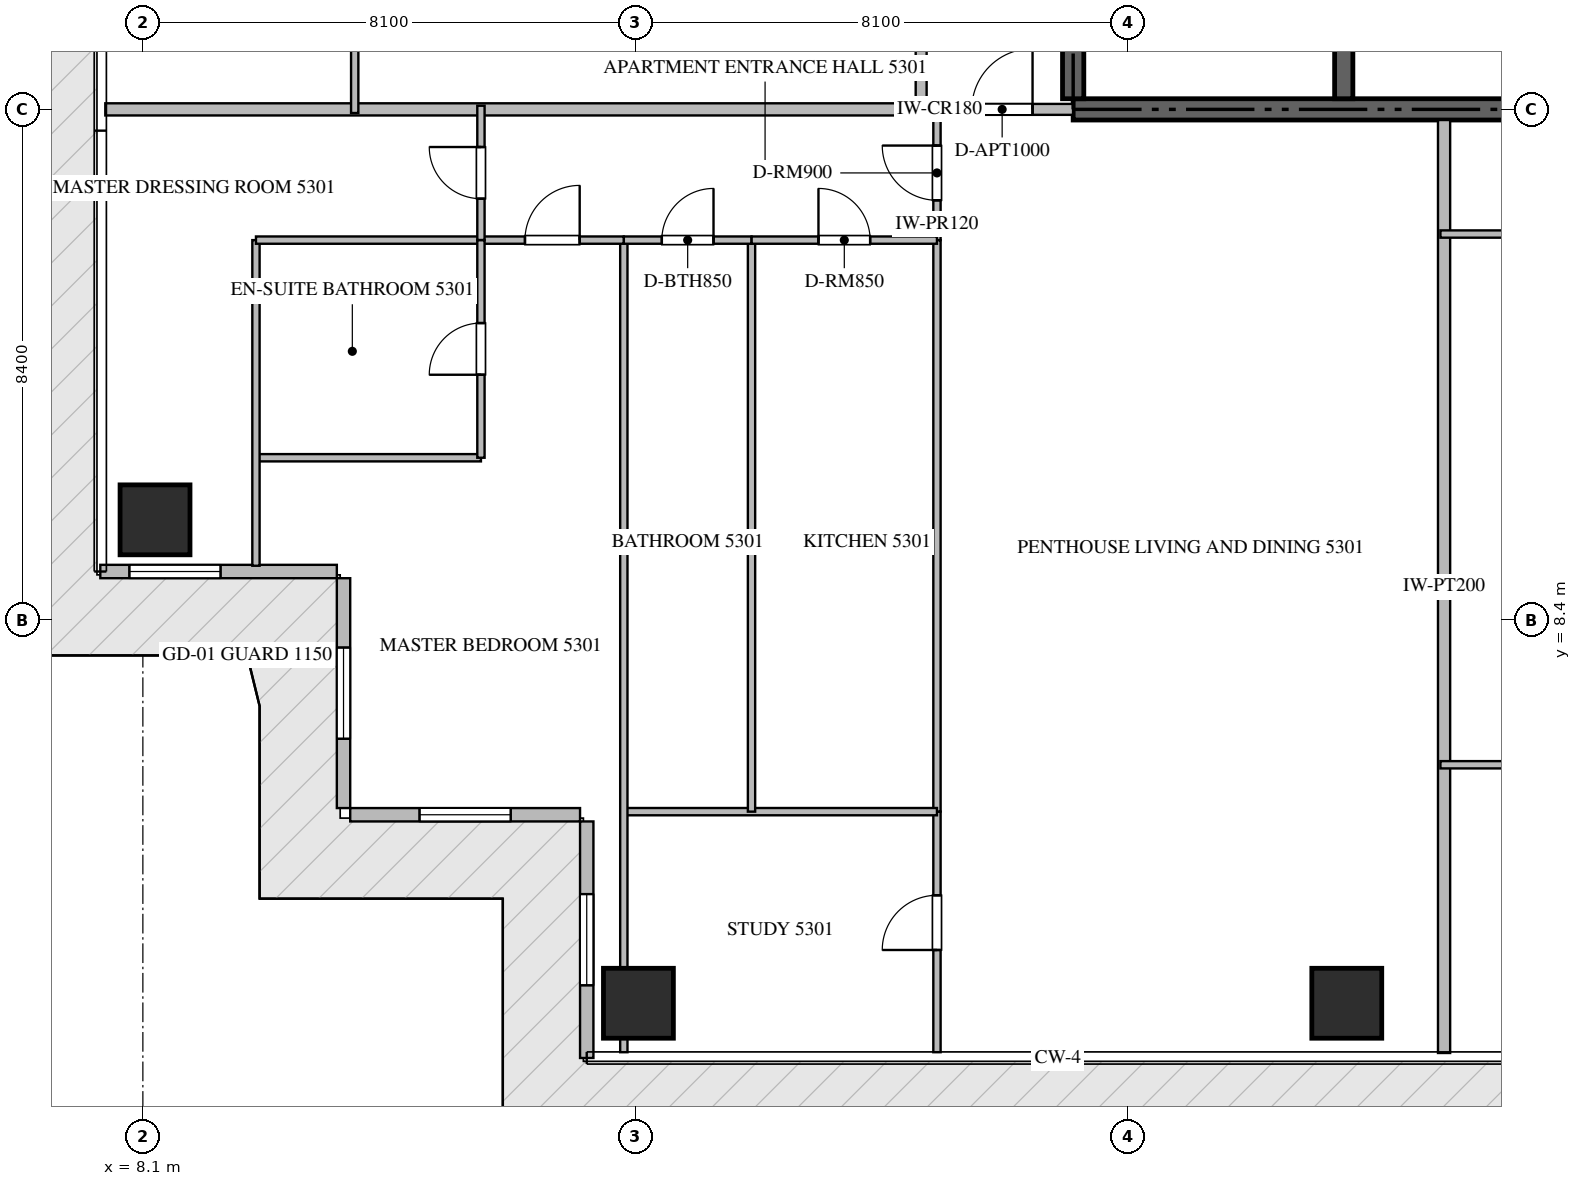
"""IFC4 building model, lengths in metres.
Left out: names, types, materials, properties, quantities, classifications, styles, units other than length and angle.
Written with IfcOpenShell. Run it as: python <this file> out.ifc"""

import sys

from ifc_helpers import new_model, si_unit, direction, frame, frame_2d, origin, origin_2d, place, context, subcontext, project, spatial, rectangle, extrude, source, transform, mapped, element, fill, save


model = new_model("IFC4")
c1 = context("Model", 3, precision=1e-05, world=origin(), true_north=direction((0.0, 1.0)))
c2 = subcontext(c1, "Body", "Model", "MODEL_VIEW")
j1 = project(units=[si_unit("LENGTHUNIT", "METRE"), si_unit("PLANEANGLEUNIT", "RADIAN")], contexts=[c1])
p1 = place(None, origin())
s1 = spatial("IfcSite", under=j1, at=p1, CompositionType="ELEMENT")
p2 = place(p1, origin())
s2 = spatial("IfcBuilding", under=s1, at=p2, CompositionType="ELEMENT")
p3 = place(p2, frame((0.0, 0.0, 214.3)))
s3 = spatial("IfcBuildingStorey", under=s2, at=p3, CompositionType="ELEMENT", Elevation=214.3)
p4 = place(p3, frame((23.4, 16.8, -0.26), z_axis=(0.0, 0.0, 1.0), x_axis=(1.0, 0.0, 0.0)))
e1 = element("IfcWall", 1, at=p4, inside=s3, PredefinedType="SHEAR", context=c2, shape_type="SweptSolid", body=[
    extrude(rectangle(XDim=18.0, YDim=0.35, at=frame_2d((9.0, 0.0))), origin(), (0.0, 0.0, 1.0), 3.848),
])
p5 = place(p3, frame((23.4, 16.975, -0.26), z_axis=(0.0, 0.0, 1.0), x_axis=(0.0, 1.0, 0.0)))
e2 = element("IfcWall", 2, at=p5, inside=s3, PredefinedType="SHEAR", context=c2, shape_type="SweptSolid", body=[
    extrude(rectangle(XDim=4.875, YDim=0.35, at=frame_2d((2.438, 0.0))), origin(), (0.0, 0.0, 1.0), 3.848),
])
p6 = place(p3, frame((27.85, 16.975, -0.26), z_axis=(0.0, 0.0, 1.0), x_axis=(0.0, 1.0, 0.0)))
e3 = element("IfcWall", 3, at=p6, inside=s3, PredefinedType="SHEAR", context=c2, shape_type="SweptSolid", body=[
    extrude(rectangle(XDim=4.875, YDim=0.3, at=frame_2d((2.438, 0.0))), origin(), (0.0, 0.0, 1.0), 3.848),
])
m1 = source(origin(), c2, "Body", "SweptSolid", [
    extrude(rectangle(XDim=1.15, YDim=1.15, at=origin_2d()), origin(), (0.0, 0.0, 1.0), 3.85),
])
for number, where, z_axis, x_axis in (
    (4, (16.25, 2.1, -0.26), (0.0, 0.0, 1.0), (1.0, 0.0, 0.0)),
    (5, (27.9, 2.1, -0.26), (0.0, 0.0, 1.0), (1.0, 0.0, 0.0)),
    (6, (8.3, 10.05, -0.26), (0.0, 0.0, 1.0), (1.0, 0.0, 0.0)),
):
    element("IfcColumn", number, at=place(p3, frame(where, z_axis=z_axis, x_axis=x_axis)), inside=s3, PredefinedType="COLUMN", context=c2, shape_type="MappedRepresentation", body=[
        mapped(m1, transform((0.0, 0.0, 0.0), scale=1.0)),
    ])
p7 = place(p3, frame((7.4, 9.2, 0.0), z_axis=(0.0, 0.0, 1.0), x_axis=(1.0, 0.0, 0.0)))
e7 = element("IfcWall", 7, at=p7, inside=s3, PredefinedType="ELEMENTEDWALL", context=c2, shape_type="SweptSolid", body=[
    extrude(rectangle(XDim=3.89, YDim=0.22, at=frame_2d((1.945, 0.0))), origin(), (0.0, 0.0, 1.0), 3.575),
])
p8 = place(p7, frame((0.478, 0.0, 0.65)))
e8 = element("IfcOpeningElement", 8, at=p8, cuts=e7, PredefinedType="OPENING", context=c2, shape_type="SweptSolid", body=[
    extrude(rectangle(XDim=1.5, YDim=2.25, at=frame_2d((0.75, 1.125))), frame((0.0, 0.12, 0.0), z_axis=(0.0, -1.0, 0.0), x_axis=(1.0, 0.0, 0.0)), (0.0, 0.0, 1.0), 0.24),
])
p9 = place(p3, frame((11.4, 9.09, 0.0), z_axis=(0.0, 0.0, 1.0), x_axis=(0.0, -1.0, 0.0)))
e9 = element("IfcWall", 9, at=p9, inside=s3, PredefinedType="ELEMENTEDWALL", context=c2, shape_type="SweptSolid", body=[
    extrude(rectangle(XDim=3.78, YDim=0.22, at=frame_2d((1.89, 0.0))), origin(), (0.0, 0.0, 1.0), 3.575),
])
p10 = place(p9, frame((1.14, 0.0, 0.65)))
e10 = element("IfcOpeningElement", 10, at=p10, cuts=e9, PredefinedType="OPENING", context=c2, shape_type="SweptSolid", body=[
    extrude(rectangle(XDim=1.5, YDim=2.25, at=frame_2d((0.75, 1.125))), frame((0.0, 0.12, 0.0), z_axis=(0.0, -1.0, 0.0), x_axis=(1.0, 0.0, 0.0)), (0.0, 0.0, 1.0), 0.24),
])
p11 = place(p3, frame((11.51, 5.2, 0.0), z_axis=(0.0, 0.0, 1.0), x_axis=(1.0, 0.0, 0.0)))
e11 = element("IfcWall", 11, at=p11, inside=s3, PredefinedType="ELEMENTEDWALL", context=c2, shape_type="SweptSolid", body=[
    extrude(rectangle(XDim=3.78, YDim=0.22, at=frame_2d((1.89, 0.0))), origin(), (0.0, 0.0, 1.0), 3.575),
])
p12 = place(p11, frame((1.14, 0.0, 0.65)))
e12 = element("IfcOpeningElement", 12, at=p12, cuts=e11, PredefinedType="OPENING", context=c2, shape_type="SweptSolid", body=[
    extrude(rectangle(XDim=1.5, YDim=2.25, at=frame_2d((0.75, 1.125))), frame((0.0, 0.12, 0.0), z_axis=(0.0, -1.0, 0.0), x_axis=(1.0, 0.0, 0.0)), (0.0, 0.0, 1.0), 0.24),
])
p13 = place(p3, frame((15.4, 5.09, 0.0), z_axis=(0.0, 0.0, 1.0), x_axis=(0.0, -1.0, 0.0)))
e13 = element("IfcWall", 13, at=p13, inside=s3, PredefinedType="ELEMENTEDWALL", context=c2, shape_type="SweptSolid", body=[
    extrude(rectangle(XDim=3.89, YDim=0.22, at=frame_2d((1.945, 0.0))), origin(), (0.0, 0.0, 1.0), 3.575),
])
p14 = place(p13, frame((1.195, 0.0, 0.65)))
e14 = element("IfcOpeningElement", 14, at=p14, cuts=e13, PredefinedType="OPENING", context=c2, shape_type="SweptSolid", body=[
    extrude(rectangle(XDim=1.5, YDim=2.25, at=frame_2d((0.75, 1.125))), frame((0.0, 0.12, 0.0), z_axis=(0.0, -1.0, 0.0), x_axis=(1.0, 0.0, 0.0)), (0.0, 0.0, 1.0), 0.24),
])
p15 = place(p3, frame((29.5, 1.282, 0.0), z_axis=(0.0, 0.0, 1.0), x_axis=(0.0, 1.0, 0.0)))
e15 = element("IfcWall", 15, at=p15, inside=s3, PredefinedType="PARTITIONING", context=c2, shape_type="SweptSolid", body=[
    extrude(rectangle(XDim=15.343, YDim=0.2, at=frame_2d((7.671, 0.0))), origin(), (0.0, 0.0, 1.0), 3.59),
])
p16 = place(p3, frame((7.482, 16.8, 0.0), z_axis=(0.0, 0.0, 1.0), x_axis=(1.0, 0.0, 0.0)))
e16 = element("IfcWall", 16, at=p16, inside=s3, PredefinedType="PARTITIONING", context=c2, shape_type="SweptSolid", body=[
    extrude(rectangle(XDim=13.418, YDim=0.2, at=frame_2d((6.709, 0.0))), origin(), (0.0, 0.0, 1.0), 3.59),
])
p17 = place(p3, frame((20.902, 16.8, 0.0), z_axis=(0.0, 0.0, 1.0), x_axis=(1.0, 0.0, 0.0)))
e17 = element("IfcWall", 17, at=p17, inside=s3, PredefinedType="PARTITIONING", context=c2, shape_type="SweptSolid", body=[
    extrude(rectangle(XDim=2.496, YDim=0.18, at=frame_2d((1.248, 0.0))), origin(), (0.0, 0.0, 1.0), 3.59),
])
p18 = place(p17, frame((0.83, 0.0, 0.0)))
e18 = element("IfcOpeningElement", 18, at=p18, cuts=e17, PredefinedType="OPENING", context=c2, shape_type="SweptSolid", body=[
    extrude(rectangle(XDim=1.0, YDim=2.15, at=frame_2d((0.5, 1.075))), frame((0.0, 0.1, 0.0), z_axis=(0.0, -1.0, 0.0), x_axis=(1.0, 0.0, 0.0)), (0.0, 0.0, 1.0), 0.2),
])
p19 = place(p3, frame((20.9, 16.8, 0.0), z_axis=(0.0, 0.0, 1.0), x_axis=(0.0, 1.0, 0.0)))
e19 = element("IfcWall", 19, at=p19, inside=s3, PredefinedType="PARTITIONING", context=c2, shape_type="SweptSolid", body=[
    extrude(rectangle(XDim=16.8, YDim=0.18, at=frame_2d((8.4, 0.0))), origin(), (0.0, 0.0, 1.0), 3.59),
])
p20 = place(p19, frame((14.5, 0.0, 0.0)))
e20 = element("IfcOpeningElement", 20, at=p20, cuts=e19, PredefinedType="OPENING", context=c2, shape_type="SweptSolid", body=[
    extrude(rectangle(XDim=1.0, YDim=2.15, at=frame_2d((0.5, 1.075))), frame((0.0, 0.1, 0.0), z_axis=(0.0, -1.0, 0.0), x_axis=(1.0, 0.0, 0.0)), (0.0, 0.0, 1.0), 0.2),
])
p21 = place(p3, frame((21.16, 14.65, 0.0), z_axis=(0.0, 0.0, 1.0), x_axis=(0.0, 1.0, 0.0)))
e21 = element("IfcWall", 21, at=p21, inside=s3, PredefinedType="PARTITIONING", context=c2, shape_type="SweptSolid", body=[
    extrude(rectangle(XDim=2.21, YDim=0.12, at=frame_2d((1.105, 0.0))), origin(), (0.0, 0.0, 1.0), 3.59),
])
p22 = place(p21, frame((0.655, 0.0, 0.0)))
e22 = element("IfcOpeningElement", 22, at=p22, cuts=e21, PredefinedType="OPENING", context=c2, shape_type="SweptSolid", body=[
    extrude(rectangle(XDim=0.9, YDim=2.1, at=frame_2d((0.45, 1.05))), frame((0.0, 0.07, 0.0), z_axis=(0.0, -1.0, 0.0), x_axis=(1.0, 0.0, 0.0)), (0.0, 0.0, 1.0), 0.14),
])
p23 = place(p3, frame((21.16, 1.295, 0.0), z_axis=(0.0, 0.0, 1.0), x_axis=(0.0, 1.0, 0.0)))
e23 = element("IfcWall", 23, at=p23, inside=s3, PredefinedType="PARTITIONING", context=c2, shape_type="SweptSolid", body=[
    extrude(rectangle(XDim=3.956, YDim=0.12, at=frame_2d((1.978, 0.0))), origin(), (0.0, 0.0, 1.0), 3.59),
])
p24 = place(p23, frame((1.681, 0.0, 0.0)))
e24 = element("IfcOpeningElement", 24, at=p24, cuts=e23, PredefinedType="OPENING", context=c2, shape_type="SweptSolid", body=[
    extrude(rectangle(XDim=0.9, YDim=2.1, at=frame_2d((0.45, 1.05))), frame((0.0, 0.07, 0.0), z_axis=(0.0, -1.0, 0.0), x_axis=(1.0, 0.0, 0.0)), (0.0, 0.0, 1.0), 0.14),
])
p25 = place(p3, frame((21.16, 5.253, 0.0), z_axis=(0.0, 0.0, 1.0), x_axis=(0.0, 1.0, 0.0)))
e25 = element("IfcWall", 25, at=p25, inside=s3, PredefinedType="PARTITIONING", context=c2, shape_type="SweptSolid", body=[
    extrude(rectangle(XDim=9.395, YDim=0.12, at=frame_2d((4.698, 0.0))), origin(), (0.0, 0.0, 1.0), 3.59),
])
p26 = place(p3, frame((16.01, 5.251, 0.0), z_axis=(0.0, 0.0, 1.0), x_axis=(1.0, 0.0, 0.0)))
e26 = element("IfcWall", 26, at=p26, inside=s3, PredefinedType="PARTITIONING", context=c2, shape_type="SweptSolid", body=[
    extrude(rectangle(XDim=5.15, YDim=0.12, at=frame_2d((2.575, 0.0))), origin(), (0.0, 0.0, 1.0), 3.59),
])
p27 = place(p3, frame((16.01, 1.295, 0.0), z_axis=(0.0, 0.0, 1.0), x_axis=(0.0, 1.0, 0.0)))
e27 = element("IfcWall", 27, at=p27, inside=s3, PredefinedType="PARTITIONING", context=c2, shape_type="SweptSolid", body=[
    extrude(rectangle(XDim=13.355, YDim=0.12, at=frame_2d((6.677, 0.0))), origin(), (0.0, 0.0, 1.0), 3.122),
])
p28 = place(p3, frame((18.11, 5.251, 0.0), z_axis=(0.0, 0.0, 1.0), x_axis=(0.0, 1.0, 0.0)))
e28 = element("IfcWall", 28, at=p28, inside=s3, PredefinedType="PARTITIONING", context=c2, shape_type="SweptSolid", body=[
    extrude(rectangle(XDim=9.399, YDim=0.12, at=frame_2d((4.699, 0.0))), origin(), (0.0, 0.0, 1.0), 3.59),
])
p29 = place(p3, frame((16.01, 14.65, 0.0), z_axis=(0.0, 0.0, 1.0), x_axis=(1.0, 0.0, 0.0)))
e29 = element("IfcWall", 29, at=p29, inside=s3, PredefinedType="PARTITIONING", context=c2, shape_type="SweptSolid", body=[
    extrude(rectangle(XDim=2.1, YDim=0.12, at=frame_2d((1.05, 0.0))), origin(), (0.0, 0.0, 1.0), 3.59),
])
p30 = place(p29, frame((0.625, 0.0, 0.0)))
e30 = element("IfcOpeningElement", 30, at=p30, cuts=e29, PredefinedType="OPENING", context=c2, shape_type="SweptSolid", body=[
    extrude(rectangle(XDim=0.85, YDim=2.1, at=frame_2d((0.425, 1.05))), frame((0.0, 0.07, 0.0), z_axis=(0.0, -1.0, 0.0), x_axis=(1.0, 0.0, 0.0)), (0.0, 0.0, 1.0), 0.14),
])
p31 = place(p3, frame((18.112, 14.65, 0.0), z_axis=(0.0, 0.0, 1.0), x_axis=(1.0, 0.0, 0.0)))
e31 = element("IfcWall", 31, at=p31, inside=s3, PredefinedType="PARTITIONING", context=c2, shape_type="SweptSolid", body=[
    extrude(rectangle(XDim=3.048, YDim=0.12, at=frame_2d((1.524, 0.0))), origin(), (0.0, 0.0, 1.0), 3.59),
])
p32 = place(p31, frame((1.099, 0.0, 0.0)))
e32 = element("IfcOpeningElement", 32, at=p32, cuts=e31, PredefinedType="OPENING", context=c2, shape_type="SweptSolid", body=[
    extrude(rectangle(XDim=0.85, YDim=2.1, at=frame_2d((0.425, 1.05))), frame((0.0, 0.07, 0.0), z_axis=(0.0, -1.0, 0.0), x_axis=(1.0, 0.0, 0.0)), (0.0, 0.0, 1.0), 0.14),
])
p33 = place(p3, frame((13.66, 14.65, 0.0), z_axis=(0.0, 0.0, 1.0), x_axis=(1.0, 0.0, 0.0)))
e33 = element("IfcWall", 33, at=p33, inside=s3, PredefinedType="PARTITIONING", context=c2, shape_type="SweptSolid", body=[
    extrude(rectangle(XDim=2.348, YDim=0.12, at=frame_2d((1.174, 0.0))), origin(), (0.0, 0.0, 1.0), 3.59),
])
p34 = place(p33, frame((0.724, 0.0, 0.0)))
e34 = element("IfcOpeningElement", 34, at=p34, cuts=e33, PredefinedType="OPENING", context=c2, shape_type="SweptSolid", body=[
    extrude(rectangle(XDim=0.9, YDim=2.1, at=frame_2d((0.45, 1.05))), frame((0.0, 0.07, 0.0), z_axis=(0.0, -1.0, 0.0), x_axis=(1.0, 0.0, 0.0)), (0.0, 0.0, 1.0), 0.14),
])
p35 = place(p3, frame((9.96, 11.071, 0.0), z_axis=(0.0, 0.0, 1.0), x_axis=(1.0, 0.0, 0.0)))
e35 = element("IfcWall", 35, at=p35, inside=s3, PredefinedType="PARTITIONING", context=c2, shape_type="SweptSolid", body=[
    extrude(rectangle(XDim=3.7, YDim=0.12, at=frame_2d((1.85, 0.0))), origin(), (0.0, 0.0, 1.0), 3.59),
])
p36 = place(p3, frame((9.96, 9.295, 0.0), z_axis=(0.0, 0.0, 1.0), x_axis=(0.0, 1.0, 0.0)))
e36 = element("IfcWall", 36, at=p36, inside=s3, PredefinedType="PARTITIONING", context=c2, shape_type="SweptSolid", body=[
    extrude(rectangle(XDim=5.355, YDim=0.12, at=frame_2d((2.677, 0.0))), origin(), (0.0, 0.0, 1.0), 3.59),
])
p37 = place(p3, frame((9.96, 14.65, 0.0), z_axis=(0.0, 0.0, 1.0), x_axis=(1.0, 0.0, 0.0)))
e37 = element("IfcWall", 37, at=p37, inside=s3, PredefinedType="PARTITIONING", context=c2, shape_type="SweptSolid", body=[
    extrude(rectangle(XDim=3.698, YDim=0.12, at=frame_2d((1.849, 0.0))), origin(), (0.0, 0.0, 1.0), 3.59),
])
p38 = place(p3, frame((13.66, 11.071, 0.0), z_axis=(0.0, 0.0, 1.0), x_axis=(0.0, 1.0, 0.0)))
e38 = element("IfcWall", 38, at=p38, inside=s3, PredefinedType="PARTITIONING", context=c2, shape_type="SweptSolid", body=[
    extrude(rectangle(XDim=3.579, YDim=0.12, at=frame_2d((1.79, 0.0))), origin(), (0.0, 0.0, 1.0), 3.59),
])
p39 = place(p38, frame((1.365, 0.0, 0.0)))
e39 = element("IfcOpeningElement", 39, at=p39, cuts=e38, PredefinedType="OPENING", context=c2, shape_type="SweptSolid", body=[
    extrude(rectangle(XDim=0.85, YDim=2.1, at=frame_2d((0.425, 1.05))), frame((0.0, 0.07, 0.0), z_axis=(0.0, -1.0, 0.0), x_axis=(1.0, 0.0, 0.0)), (0.0, 0.0, 1.0), 0.14),
])
p40 = place(p3, frame((13.66, 14.652, 0.0), z_axis=(0.0, 0.0, 1.0), x_axis=(0.0, 1.0, 0.0)))
e40 = element("IfcWall", 40, at=p40, inside=s3, PredefinedType="PARTITIONING", context=c2, shape_type="SweptSolid", body=[
    extrude(rectangle(XDim=2.208, YDim=0.12, at=frame_2d((1.104, 0.0))), origin(), (0.0, 0.0, 1.0), 3.59),
])
p41 = place(p40, frame((0.679, 0.0, 0.0)))
e41 = element("IfcOpeningElement", 41, at=p41, cuts=e40, PredefinedType="OPENING", context=c2, shape_type="SweptSolid", body=[
    extrude(rectangle(XDim=0.85, YDim=2.1, at=frame_2d((0.425, 1.05))), frame((0.0, 0.07, 0.0), z_axis=(0.0, -1.0, 0.0), x_axis=(1.0, 0.0, 0.0)), (0.0, 0.0, 1.0), 0.14),
])
for number, where, z_axis, x_axis in (
    (42, (29.44, 6.022, 0.0), (0.0, 0.0, 1.0), (1.0, 0.0, 0.0)),
    (43, (29.44, 14.75, 0.0), (0.0, 0.0, 1.0), (1.0, 0.0, 0.0)),
):
    element("IfcWall", number, at=place(p3, frame(where, z_axis=z_axis, x_axis=x_axis)), inside=s3, PredefinedType="PARTITIONING", context=c2, shape_type="SweptSolid", body=[
        extrude(rectangle(XDim=9.06, YDim=0.12, at=frame_2d((4.53, 0.0))), origin(), (0.0, 0.0, 1.0), 3.59),
    ])
p42 = place(p3, frame((11.584, 16.74, 0.0), z_axis=(0.0, 0.0, 1.0), x_axis=(0.0, 1.0, 0.0)))
e44 = element("IfcWall", 44, at=p42, inside=s3, PredefinedType="PARTITIONING", context=c2, shape_type="SweptSolid", body=[
    extrude(rectangle(XDim=10.48, YDim=0.12, at=frame_2d((5.24, 0.0))), origin(), (0.0, 0.0, 1.0), 3.59),
])
m2 = source(origin(), c2, "Body", "SweptSolid", [
    extrude(rectangle(XDim=1.5, YDim=2.25, at=frame_2d((0.75, 1.125))), frame((0.0, 0.03, 0.0), z_axis=(0.0, -1.0, 0.0), x_axis=(1.0, 0.0, 0.0)), (0.0, 0.0, 1.0), 0.06),
])
p43 = place(p8, origin())
e45 = element("IfcWindow", 45, at=p43, inside=s3, PartitioningType="SINGLE_PANEL", PredefinedType="WINDOW", context=c2, shape_type="MappedRepresentation", body=[
    mapped(m2, transform((0.0, 0.0, 0.0), scale=1.0)),
])
fill(e8, e45)
p44 = place(p10, origin())
e46 = element("IfcWindow", 46, at=p44, inside=s3, PartitioningType="SINGLE_PANEL", PredefinedType="WINDOW", context=c2, shape_type="MappedRepresentation", body=[
    mapped(m2, transform((0.0, 0.0, 0.0), scale=1.0)),
])
fill(e10, e46)
p45 = place(p12, origin())
e47 = element("IfcWindow", 47, at=p45, inside=s3, PartitioningType="SINGLE_PANEL", PredefinedType="WINDOW", context=c2, shape_type="MappedRepresentation", body=[
    mapped(m2, transform((0.0, 0.0, 0.0), scale=1.0)),
])
fill(e12, e47)
p46 = place(p14, origin())
e48 = element("IfcWindow", 48, at=p46, inside=s3, PartitioningType="SINGLE_PANEL", PredefinedType="WINDOW", context=c2, shape_type="MappedRepresentation", body=[
    mapped(m2, transform((0.0, 0.0, 0.0), scale=1.0)),
])
fill(e14, e48)
m3 = source(origin(), c2, "Body", "SweptSolid", [
    extrude(rectangle(XDim=1.0, YDim=2.15, at=frame_2d((0.5, 1.075))), frame((0.0, 0.025, 0.0), z_axis=(0.0, -1.0, 0.0), x_axis=(1.0, 0.0, 0.0)), (0.0, 0.0, 1.0), 0.05),
])
p47 = place(p18, origin())
e49 = element("IfcDoor", 49, at=p47, inside=s3, OperationType="SINGLE_SWING_RIGHT", PredefinedType="DOOR", context=c2, shape_type="MappedRepresentation", body=[
    mapped(m3, transform((0.0, 0.0, 0.0), scale=1.0)),
])
fill(e18, e49)
m4 = source(origin(), c2, "Body", "SweptSolid", [
    extrude(rectangle(XDim=0.9, YDim=2.1, at=frame_2d((0.45, 1.05))), frame((0.0, 0.025, 0.0), z_axis=(0.0, -1.0, 0.0), x_axis=(1.0, 0.0, 0.0)), (0.0, 0.0, 1.0), 0.05),
])
p48 = place(p22, origin())
e50 = element("IfcDoor", 50, at=p48, inside=s3, OperationType="SINGLE_SWING_RIGHT", PredefinedType="DOOR", context=c2, shape_type="MappedRepresentation", body=[
    mapped(m4, transform((0.0, 0.0, 0.0), scale=1.0)),
])
fill(e22, e50)
p49 = place(p24, origin())
e51 = element("IfcDoor", 51, at=p49, inside=s3, OperationType="SINGLE_SWING_LEFT", PredefinedType="DOOR", context=c2, shape_type="MappedRepresentation", body=[
    mapped(m4, transform((0.0, 0.0, 0.0), scale=1.0)),
])
fill(e24, e51)
m5 = source(origin(), c2, "Body", "SweptSolid", [
    extrude(rectangle(XDim=0.85, YDim=2.1, at=frame_2d((0.425, 1.05))), frame((0.0, 0.025, 0.0), z_axis=(0.0, -1.0, 0.0), x_axis=(1.0, 0.0, 0.0)), (0.0, 0.0, 1.0), 0.05),
])
p50 = place(p30, origin())
e52 = element("IfcDoor", 52, at=p50, inside=s3, OperationType="SINGLE_SWING_RIGHT", PredefinedType="DOOR", context=c2, shape_type="MappedRepresentation", body=[
    mapped(m5, transform((0.0, 0.0, 0.0), scale=1.0)),
])
fill(e30, e52)
p51 = place(p32, origin())
e53 = element("IfcDoor", 53, at=p51, inside=s3, OperationType="SINGLE_SWING_LEFT", PredefinedType="DOOR", context=c2, shape_type="MappedRepresentation", body=[
    mapped(m5, transform((0.0, 0.0, 0.0), scale=1.0)),
])
fill(e32, e53)
p52 = place(p34, origin())
e54 = element("IfcDoor", 54, at=p52, inside=s3, OperationType="SINGLE_SWING_RIGHT", PredefinedType="DOOR", context=c2, shape_type="MappedRepresentation", body=[
    mapped(m4, transform((0.0, 0.0, 0.0), scale=1.0)),
])
fill(e34, e54)
p53 = place(p39, origin())
e55 = element("IfcDoor", 55, at=p53, inside=s3, OperationType="SINGLE_SWING_LEFT", PredefinedType="DOOR", context=c2, shape_type="MappedRepresentation", body=[
    mapped(m5, transform((0.0, 0.0, 0.0), scale=1.0)),
])
fill(e39, e55)
p54 = place(p41, origin())
e56 = element("IfcDoor", 56, at=p54, inside=s3, OperationType="SINGLE_SWING_RIGHT", PredefinedType="DOOR", context=c2, shape_type="MappedRepresentation", body=[
    mapped(m5, transform((0.0, 0.0, 0.0), scale=1.0)),
])
fill(e41, e56)
save(model, sys.argv[1])
